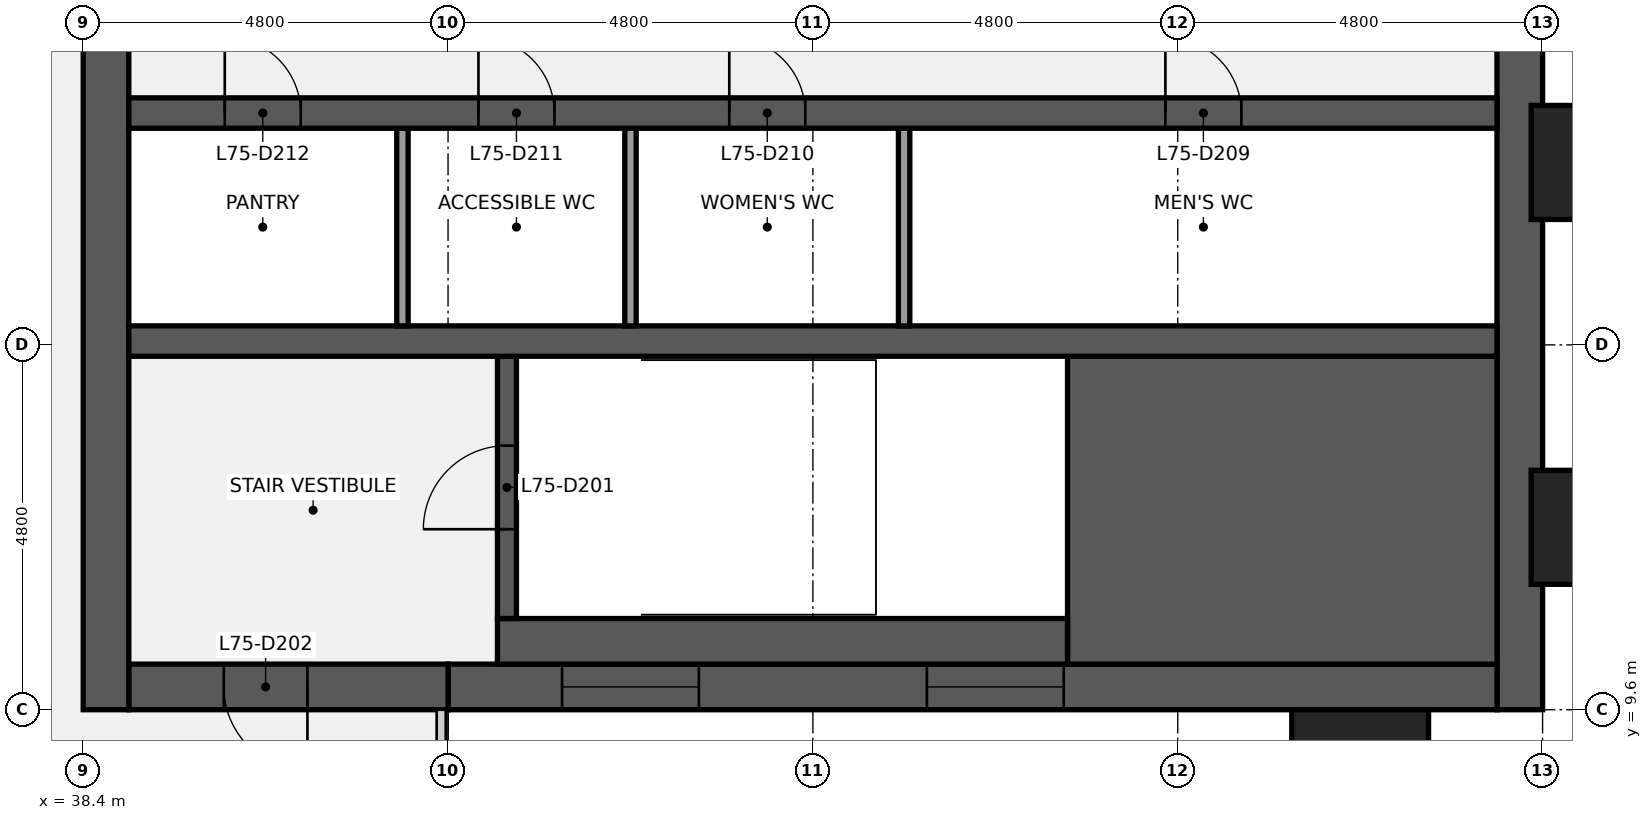
"""IFC4 building model, lengths in metres.
Left out: names, types, materials, properties, quantities, classifications, styles, units other than length and angle.
Written with IfcOpenShell. Run it as: python <this file> out.ifc"""

import sys

from ifc_helpers import new_model, si_unit, direction, frame, frame_2d, origin, origin_2d, place, context, subcontext, project, spatial, rectangle, extrude, element, fill, save


model = new_model("IFC4")
c1 = context("Model", 3, precision=1e-05, world=origin(), true_north=direction((0.0, 1.0)))
c2 = subcontext(c1, "Body", "Model", "MODEL_VIEW")
j1 = project(units=[si_unit("LENGTHUNIT", "METRE"), si_unit("PLANEANGLEUNIT", "RADIAN")], contexts=[c1])
p1 = place(None, origin())
s1 = spatial("IfcSite", under=j1, at=p1, CompositionType="ELEMENT")
p2 = place(p1, origin())
s2 = spatial("IfcBuilding", under=s1, at=p2, CompositionType="ELEMENT")
p3 = place(p2, frame((0.0, 0.0, 338.3)))
s3 = spatial("IfcBuildingStorey", under=s2, at=p3, CompositionType="ELEMENT", Elevation=338.3)
p4 = place(p3, frame((57.3, 38.4, 0.0), z_axis=(0.0, 0.0, 1.0), x_axis=(0.0, -1.0, 0.0)))
e1 = element("IfcWall", 1, at=p4, inside=s3, PredefinedType="SHEAR", context=c2, shape_type="SweptSolid", body=[
    extrude(rectangle(XDim=28.8, YDim=0.6, at=frame_2d((14.4, 0.0))), origin(), (0.0, 0.0, 1.0), 3.84),
])
p5 = place(p4, frame((18.45, 0.0, 0.9)))
e2 = element("IfcOpeningElement", 2, at=p5, cuts=e1, PredefinedType="OPENING", context=c2, shape_type="SweptSolid", body=[
    extrude(rectangle(XDim=1.5, YDim=1.5, at=frame_2d((0.75, 0.75))), frame((0.0, 0.31, 0.0), z_axis=(0.0, -1.0, 0.0), x_axis=(1.0, 0.0, 0.0)), (0.0, 0.0, 1.0), 0.62),
])
p6 = place(p4, frame((8.85, 0.0, 0.9)))
e3 = element("IfcOpeningElement", 3, at=p6, cuts=e1, PredefinedType="OPENING", context=c2, shape_type="SweptSolid", body=[
    extrude(rectangle(XDim=1.5, YDim=1.5, at=frame_2d((0.75, 0.75))), frame((0.0, 0.31, 0.0), z_axis=(0.0, -1.0, 0.0), x_axis=(1.0, 0.0, 0.0)), (0.0, 0.0, 1.0), 0.62),
])
p7 = place(p3, frame((57.0, 9.9, 0.0), z_axis=(0.0, 0.0, 1.0), x_axis=(-1.0, 0.0, 0.0)))
e4 = element("IfcWall", 4, at=p7, inside=s3, PredefinedType="SHEAR", context=c2, shape_type="SweptSolid", body=[
    extrude(rectangle(XDim=13.8, YDim=0.6, at=frame_2d((6.9, 0.0))), origin(), (0.0, 0.0, 1.0), 3.84),
])
p8 = place(p7, frame((5.7, 0.0, 0.9)))
e5 = element("IfcOpeningElement", 5, at=p8, cuts=e4, PredefinedType="OPENING", context=c2, shape_type="SweptSolid", body=[
    extrude(rectangle(XDim=1.8, YDim=1.5, at=frame_2d((0.9, 0.75))), frame((0.0, 0.31, 0.0), z_axis=(0.0, -1.0, 0.0), x_axis=(1.0, 0.0, 0.0)), (0.0, 0.0, 1.0), 0.62),
])
p9 = place(p7, frame((10.5, 0.0, 0.9)))
e6 = element("IfcOpeningElement", 6, at=p9, cuts=e4, PredefinedType="OPENING", context=c2, shape_type="SweptSolid", body=[
    extrude(rectangle(XDim=1.8, YDim=1.5, at=frame_2d((0.9, 0.75))), frame((0.0, 0.31, 0.0), z_axis=(0.0, -1.0, 0.0), x_axis=(1.0, 0.0, 0.0)), (0.0, 0.0, 1.0), 0.62),
])
p10 = place(p3, frame((43.2, 9.9, 0.0), z_axis=(0.0, 0.0, 1.0), x_axis=(-1.0, 0.0, 0.0)))
e7 = element("IfcWall", 7, at=p10, inside=s3, PredefinedType="SHEAR", context=c2, shape_type="SweptSolid", body=[
    extrude(rectangle(XDim=4.2, YDim=0.6, at=frame_2d((2.1, 0.0))), origin(), (0.0, 0.0, 1.0), 3.84),
])
p11 = place(p10, frame((1.85, 0.0, 0.0)))
e8 = element("IfcOpeningElement", 8, at=p11, cuts=e7, PredefinedType="OPENING", context=c2, shape_type="SweptSolid", body=[
    extrude(rectangle(XDim=1.1, YDim=2.1, at=frame_2d((0.55, 1.05))), frame((0.0, 0.31, 0.0), z_axis=(0.0, -1.0, 0.0), x_axis=(1.0, 0.0, 0.0)), (0.0, 0.0, 1.0), 0.62),
])
p12 = place(p3, frame((38.7, 9.6, 0.0), z_axis=(0.0, 0.0, 1.0), x_axis=(0.0, 1.0, 0.0)))
e9 = element("IfcWall", 9, at=p12, inside=s3, PredefinedType="SHEAR", context=c2, shape_type="SweptSolid", body=[
    extrude(rectangle(XDim=28.8, YDim=0.6, at=frame_2d((14.4, 0.0))), origin(), (0.0, 0.0, 1.0), 3.84),
])
p13 = place(p12, frame((8.7, 0.0, 0.0)))
e10 = element("IfcOpeningElement", 10, at=p13, cuts=e9, PredefinedType="OPENING", context=c2, shape_type="SweptSolid", body=[
    extrude(rectangle(XDim=1.8, YDim=2.1, at=frame_2d((0.9, 1.05))), frame((0.0, 0.31, 0.0), z_axis=(0.0, -1.0, 0.0), x_axis=(1.0, 0.0, 0.0)), (0.0, 0.0, 1.0), 0.62),
])
p14 = place(p12, frame((18.3, 0.0, 0.0)))
e11 = element("IfcOpeningElement", 11, at=p14, cuts=e9, PredefinedType="OPENING", context=c2, shape_type="SweptSolid", body=[
    extrude(rectangle(XDim=1.8, YDim=2.1, at=frame_2d((0.9, 1.05))), frame((0.0, 0.31, 0.0), z_axis=(0.0, -1.0, 0.0), x_axis=(1.0, 0.0, 0.0)), (0.0, 0.0, 1.0), 0.62),
])
p15 = place(p3, frame((51.35, 12.225, 0.0), z_axis=(0.0, 0.0, 1.0), x_axis=(1.0, 0.0, 0.0)))
e12 = element("IfcWall", 12, at=p15, inside=s3, PredefinedType="SHEAR", context=c2, shape_type="SweptSolid", body=[
    extrude(rectangle(XDim=5.65, YDim=4.05, at=frame_2d((2.825, 0.0))), origin(), (0.0, 0.0, 1.0), 3.84),
])
p16 = place(p3, frame((43.85, 10.5, 0.0), z_axis=(0.0, 0.0, 1.0), x_axis=(1.0, 0.0, 0.0)))
e13 = element("IfcWall", 13, at=p16, inside=s3, PredefinedType="SHEAR", context=c2, shape_type="SweptSolid", body=[
    extrude(rectangle(XDim=7.5, YDim=0.6, at=frame_2d((3.75, 0.0))), origin(), (0.0, 0.0, 1.0), 3.84),
])
p17 = place(p3, frame((43.975, 10.8, 0.0), z_axis=(0.0, 0.0, 1.0), x_axis=(0.0, 1.0, 0.0)))
e14 = element("IfcWall", 14, at=p17, inside=s3, PredefinedType="SHEAR", context=c2, shape_type="SweptSolid", body=[
    extrude(rectangle(XDim=3.45, YDim=0.25, at=frame_2d((1.725, 0.0))), origin(), (0.0, 0.0, 1.0), 3.84),
])
p18 = place(p17, frame((1.175, 0.0, 0.0)))
e15 = element("IfcOpeningElement", 15, at=p18, cuts=e14, PredefinedType="OPENING", context=c2, shape_type="SweptSolid", body=[
    extrude(rectangle(XDim=1.1, YDim=2.1, at=frame_2d((0.55, 1.05))), frame((0.0, 0.135, 0.0), z_axis=(0.0, -1.0, 0.0), x_axis=(1.0, 0.0, 0.0)), (0.0, 0.0, 1.0), 0.27),
])
p19 = place(p3, frame((39.0, 14.45, 0.0), z_axis=(0.0, 0.0, 1.0), x_axis=(1.0, 0.0, 0.0)))
e16 = element("IfcWall", 16, at=p19, inside=s3, PredefinedType="SHEAR", context=c2, shape_type="SweptSolid", body=[
    extrude(rectangle(XDim=18.0, YDim=0.4, at=frame_2d((9.0, 0.0))), origin(), (0.0, 0.0, 1.0), 3.84),
])
for number, where, z_axis, x_axis in (
    (17, (49.2, 14.65, 0.0), (0.0, 0.0, 1.0), (0.0, 1.0, 0.0)),
    (18, (45.6, 14.65, 0.0), (0.0, 0.0, 1.0), (0.0, 1.0, 0.0)),
    (19, (42.6, 14.65, 0.0), (0.0, 0.0, 1.0), (0.0, 1.0, 0.0)),
):
    element("IfcWall", number, at=place(p3, frame(where, z_axis=z_axis, x_axis=x_axis)), inside=s3, PredefinedType="PARTITIONING", context=c2, shape_type="SweptSolid", body=[
        extrude(rectangle(XDim=2.6, YDim=0.15, at=frame_2d((1.3, 0.0))), origin(), (0.0, 0.0, 1.0), 3.84),
    ])
p20 = place(p3, frame((39.0, 17.45, 0.0), z_axis=(0.0, 0.0, 1.0), x_axis=(1.0, 0.0, 0.0)))
e20 = element("IfcWall", 20, at=p20, inside=s3, PredefinedType="SHEAR", context=c2, shape_type="SweptSolid", body=[
    extrude(rectangle(XDim=18.0, YDim=0.4, at=frame_2d((9.0, 0.0))), origin(), (0.0, 0.0, 1.0), 3.84),
])
p21 = place(p20, frame((13.637, 0.0, 0.0)))
e21 = element("IfcOpeningElement", 21, at=p21, cuts=e20, PredefinedType="OPENING", context=c2, shape_type="SweptSolid", body=[
    extrude(rectangle(XDim=1.0, YDim=2.1, at=frame_2d((0.5, 1.05))), frame((0.0, 0.21, 0.0), z_axis=(0.0, -1.0, 0.0), x_axis=(1.0, 0.0, 0.0)), (0.0, 0.0, 1.0), 0.42),
])
p22 = place(p20, frame((7.9, 0.0, 0.0)))
e22 = element("IfcOpeningElement", 22, at=p22, cuts=e20, PredefinedType="OPENING", context=c2, shape_type="SweptSolid", body=[
    extrude(rectangle(XDim=1.0, YDim=2.1, at=frame_2d((0.5, 1.05))), frame((0.0, 0.21, 0.0), z_axis=(0.0, -1.0, 0.0), x_axis=(1.0, 0.0, 0.0)), (0.0, 0.0, 1.0), 0.42),
])
p23 = place(p20, frame((4.6, 0.0, 0.0)))
e23 = element("IfcOpeningElement", 23, at=p23, cuts=e20, PredefinedType="OPENING", context=c2, shape_type="SweptSolid", body=[
    extrude(rectangle(XDim=1.0, YDim=2.1, at=frame_2d((0.5, 1.05))), frame((0.0, 0.21, 0.0), z_axis=(0.0, -1.0, 0.0), x_axis=(1.0, 0.0, 0.0)), (0.0, 0.0, 1.0), 0.42),
])
p24 = place(p20, frame((1.262, 0.0, 0.0)))
e24 = element("IfcOpeningElement", 24, at=p24, cuts=e20, PredefinedType="OPENING", context=c2, shape_type="SweptSolid", body=[
    extrude(rectangle(XDim=1.0, YDim=2.1, at=frame_2d((0.5, 1.05))), frame((0.0, 0.21, 0.0), z_axis=(0.0, -1.0, 0.0), x_axis=(1.0, 0.0, 0.0)), (0.0, 0.0, 1.0), 0.42),
])
for number, where, z_axis, x_axis in (
    (25, (55.2, 8.85, 0.0), (0.0, 0.0, 1.0), (1.0, 0.0, 0.0)),
    (26, (58.35, 12.0, 0.0), (0.0, 0.0, 1.0), (0.0, 1.0, 0.0)),
    (27, (58.35, 16.8, 0.0), (0.0, 0.0, 1.0), (0.0, 1.0, 0.0)),
):
    element("IfcColumn", number, at=place(p3, frame(where, z_axis=z_axis, x_axis=x_axis)), inside=s3, PredefinedType="PILASTER", context=c2, shape_type="SweptSolid", body=[
        extrude(rectangle(XDim=1.8, YDim=1.5, at=origin_2d()), origin(), (0.0, 0.0, 1.0), 4.0),
    ])
p25 = place(p18, origin())
e28 = element("IfcDoor", 28, at=p25, inside=s3, OperationType="SINGLE_SWING_LEFT", PredefinedType="DOOR", context=c2, shape_type="SweptSolid", body=[
    extrude(rectangle(XDim=1.1, YDim=2.1, at=frame_2d((0.55, 1.05))), frame((0.0, 0.025, 0.0), z_axis=(0.0, -1.0, 0.0), x_axis=(1.0, 0.0, 0.0)), (0.0, 0.0, 1.0), 0.05),
])
fill(e15, e28)
p26 = place(p11, origin())
e29 = element("IfcDoor", 29, at=p26, inside=s3, OperationType="SINGLE_SWING_LEFT", PredefinedType="DOOR", context=c2, shape_type="SweptSolid", body=[
    extrude(rectangle(XDim=1.1, YDim=2.1, at=frame_2d((0.55, 1.05))), frame((0.0, 0.025, 0.0), z_axis=(0.0, -1.0, 0.0), x_axis=(1.0, 0.0, 0.0)), (0.0, 0.0, 1.0), 0.05),
])
fill(e8, e29)
p27 = place(p21, origin())
e30 = element("IfcDoor", 30, at=p27, inside=s3, OperationType="SINGLE_SWING_LEFT", PredefinedType="DOOR", context=c2, shape_type="SweptSolid", body=[
    extrude(rectangle(XDim=1.0, YDim=2.1, at=frame_2d((0.5, 1.05))), frame((0.0, 0.025, 0.0), z_axis=(0.0, -1.0, 0.0), x_axis=(1.0, 0.0, 0.0)), (0.0, 0.0, 1.0), 0.05),
])
fill(e21, e30)
p28 = place(p22, origin())
e31 = element("IfcDoor", 31, at=p28, inside=s3, OperationType="SINGLE_SWING_LEFT", PredefinedType="DOOR", context=c2, shape_type="SweptSolid", body=[
    extrude(rectangle(XDim=1.0, YDim=2.1, at=frame_2d((0.5, 1.05))), frame((0.0, 0.025, 0.0), z_axis=(0.0, -1.0, 0.0), x_axis=(1.0, 0.0, 0.0)), (0.0, 0.0, 1.0), 0.05),
])
fill(e22, e31)
p29 = place(p23, origin())
e32 = element("IfcDoor", 32, at=p29, inside=s3, OperationType="SINGLE_SWING_LEFT", PredefinedType="DOOR", context=c2, shape_type="SweptSolid", body=[
    extrude(rectangle(XDim=1.0, YDim=2.1, at=frame_2d((0.5, 1.05))), frame((0.0, 0.025, 0.0), z_axis=(0.0, -1.0, 0.0), x_axis=(1.0, 0.0, 0.0)), (0.0, 0.0, 1.0), 0.05),
])
fill(e23, e32)
p30 = place(p24, origin())
e33 = element("IfcDoor", 33, at=p30, inside=s3, OperationType="SINGLE_SWING_LEFT", PredefinedType="DOOR", context=c2, shape_type="SweptSolid", body=[
    extrude(rectangle(XDim=1.0, YDim=2.1, at=frame_2d((0.5, 1.05))), frame((0.0, 0.025, 0.0), z_axis=(0.0, -1.0, 0.0), x_axis=(1.0, 0.0, 0.0)), (0.0, 0.0, 1.0), 0.05),
])
fill(e24, e33)
p31 = place(p8, origin())
e34 = element("IfcWindow", 34, at=p31, inside=s3, PartitioningType="SINGLE_PANEL", PredefinedType="WINDOW", context=c2, shape_type="SweptSolid", body=[
    extrude(rectangle(XDim=1.8, YDim=1.5, at=frame_2d((0.9, 0.75))), frame((0.0, 0.03, 0.0), z_axis=(0.0, -1.0, 0.0), x_axis=(1.0, 0.0, 0.0)), (0.0, 0.0, 1.0), 0.06),
])
fill(e5, e34)
p32 = place(p9, origin())
e35 = element("IfcWindow", 35, at=p32, inside=s3, PartitioningType="SINGLE_PANEL", PredefinedType="WINDOW", context=c2, shape_type="SweptSolid", body=[
    extrude(rectangle(XDim=1.8, YDim=1.5, at=frame_2d((0.9, 0.75))), frame((0.0, 0.03, 0.0), z_axis=(0.0, -1.0, 0.0), x_axis=(1.0, 0.0, 0.0)), (0.0, 0.0, 1.0), 0.06),
])
fill(e6, e35)
save(model, sys.argv[1])
